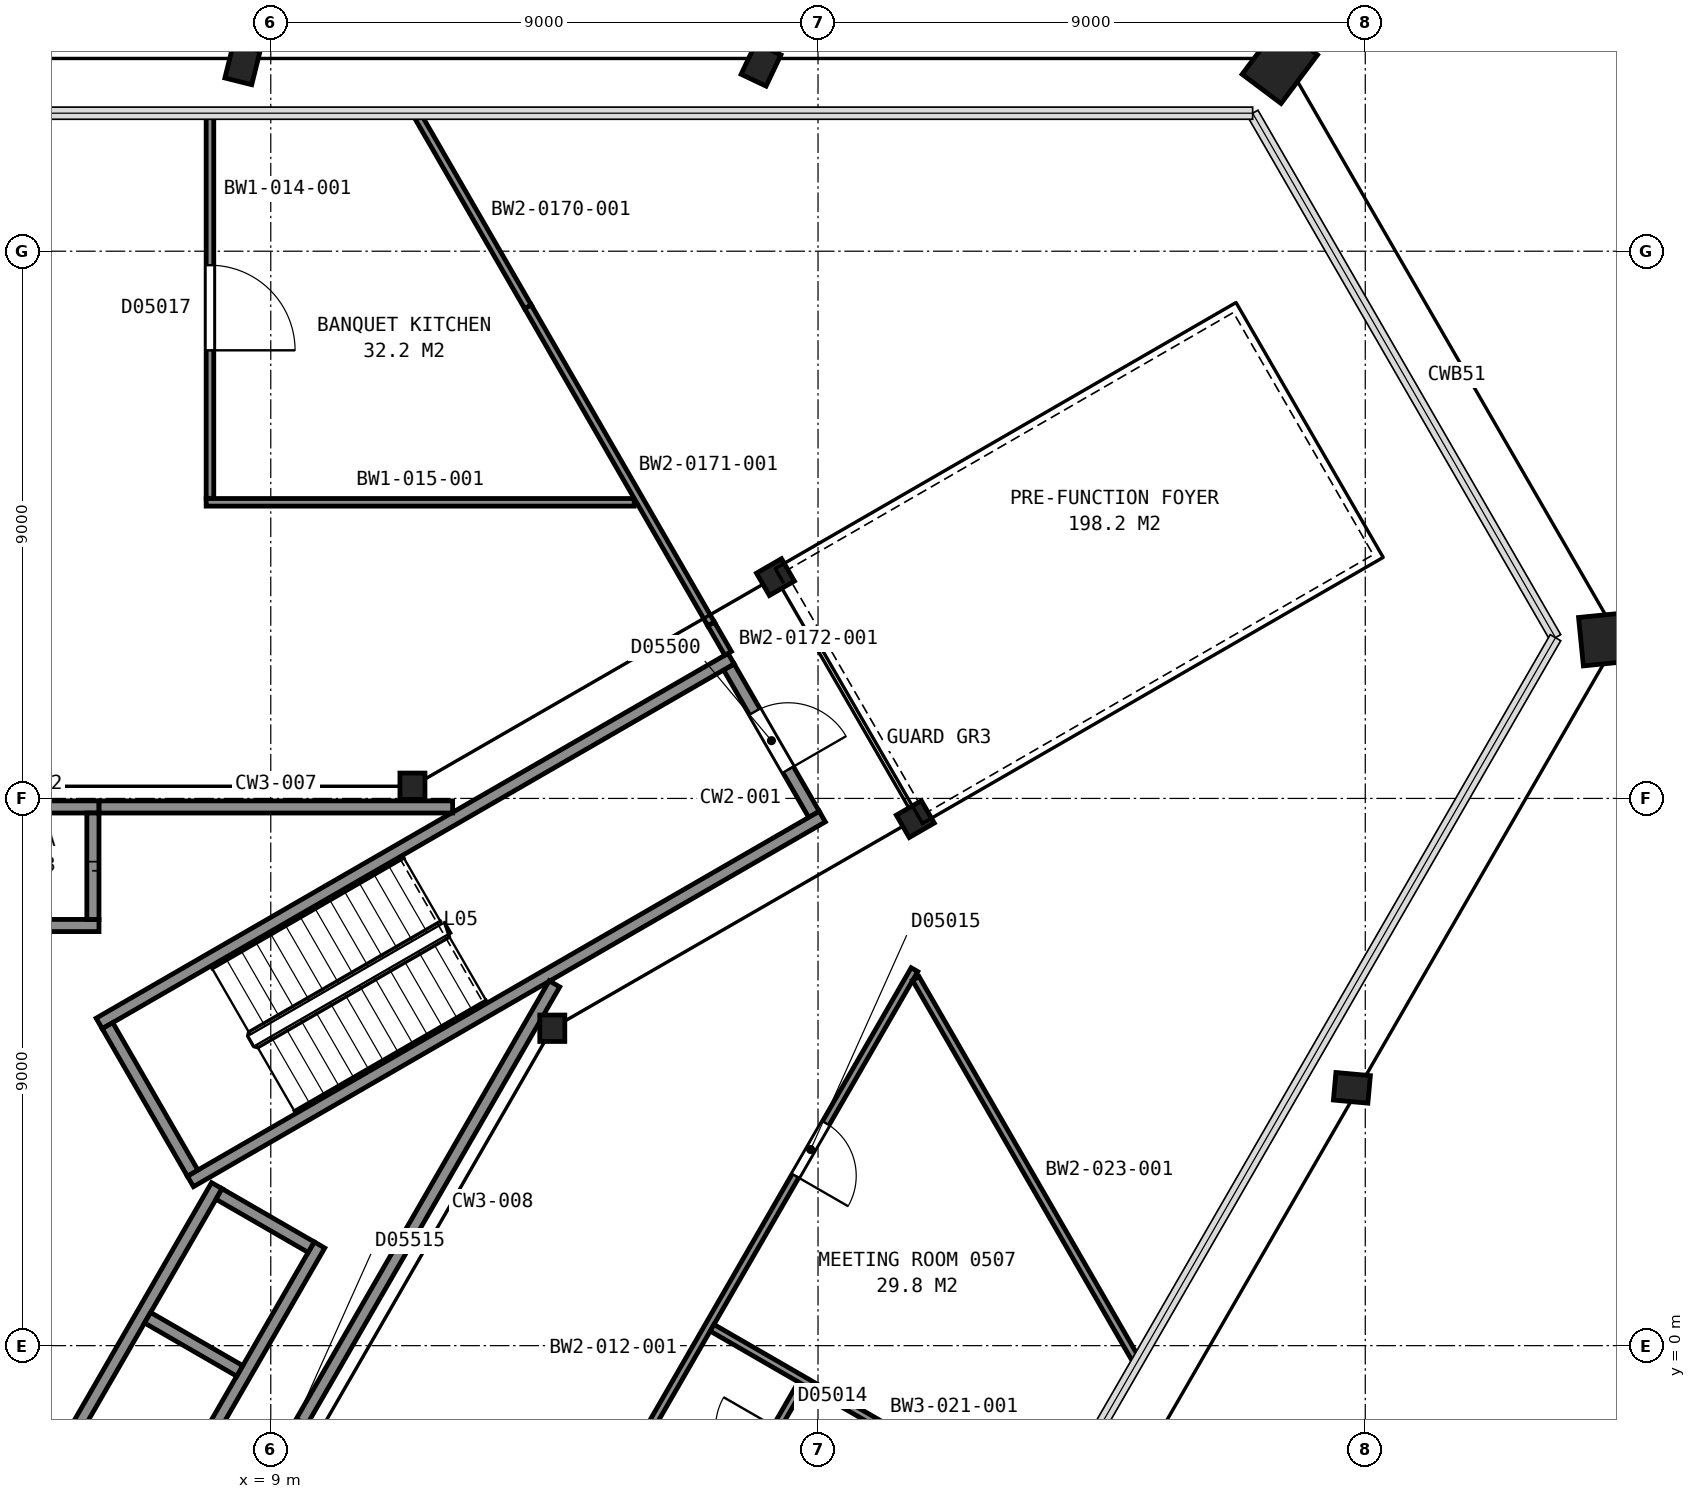
"""IFC4 building model, lengths in metres.
Left out: names, types, materials, properties, quantities, classifications, styles, units other than length and angle.
Written with IfcOpenShell. Run it as: python <this file> out.ifc"""

import sys

from ifc_helpers import new_model, si_unit, direction, frame, frame_2d, origin, origin_2d, place, context, subcontext, project, spatial, rectangle, hollow_rectangle, i_section, extrude, element, fill, save


model = new_model("IFC4")
c1 = context("Model", 3, precision=1e-05, world=origin(), true_north=direction((0.0, 1.0)))
c2 = subcontext(c1, "Body", "Model", "MODEL_VIEW")
j1 = project(units=[si_unit("LENGTHUNIT", "METRE"), si_unit("PLANEANGLEUNIT", "RADIAN")], contexts=[c1])
p1 = place(None, origin())
s1 = spatial("IfcSite", under=j1, at=p1, CompositionType="ELEMENT")
p2 = place(p1, origin())
s2 = spatial("IfcBuilding", under=s1, at=p2, CompositionType="ELEMENT")
p3 = place(p2, frame((0.0, 0.0, 32.0)))
s3 = spatial("IfcBuildingStorey", under=s2, at=p3, CompositionType="ELEMENT", Elevation=32.0)
p4 = place(p3, frame((25.667, 21.166, 0.045), z_axis=(-0.06217640116, -0.082901868214, 0.994616195015), x_axis=(0.499582435164, -0.865300616168, -0.040892959465)))
e1 = element("IfcColumn", 1, at=p4, inside=s3, PredefinedType="COLUMN", context=c2, shape_type="SweptSolid", body=[
    extrude(hollow_rectangle(XDim=0.8, YDim=1.0, WallThickness=0.075, at=origin_2d()), origin(), (0.0, 0.0, 1.0), 4.735),
])
p5 = place(p3, frame((17.109, 21.167, 0.03), z_axis=(-0.039441005649, -0.082985106815, 0.995769993081), x_axis=(0.999217228346, -0.000227977802, 0.039558546511)))
e2 = element("IfcColumn", 2, at=p5, inside=s3, PredefinedType="COLUMN", context=c2, shape_type="SweptSolid", body=[
    extrude(i_section(OverallWidth=0.455, OverallDepth=0.569, WebThickness=0.078, FlangeThickness=0.125, FilletRadius=0.015, at=origin_2d()), origin(), (0.0, 0.0, 1.0), 4.76),
])
p6 = place(p3, frame((8.56, 21.168, 0.025), z_axis=(-0.020791051327, -0.083010576852, 0.996331760166), x_axis=(0.999783003146, -0.000434756363, 0.020826848233)))
e3 = element("IfcColumn", 3, at=p6, inside=s3, PredefinedType="COLUMN", context=c2, shape_type="SweptSolid", body=[
    extrude(i_section(OverallWidth=0.455, OverallDepth=0.569, WebThickness=0.078, FlangeThickness=0.125, FilletRadius=0.015, at=origin_2d()), origin(), (0.0, 0.0, 1.0), 4.768),
])
p7 = place(p3, frame((26.887, 4.23, 0.03), z_axis=(-0.091244770768, 0.008308967321, 0.995793830504), x_axis=(-0.499759929446, -0.865304652417, -0.03857293643)))
e4 = element("IfcColumn", 4, at=p7, inside=s3, PredefinedType="COLUMN", context=c2, shape_type="SweptSolid", body=[
    extrude(i_section(OverallWidth=0.455, OverallDepth=0.569, WebThickness=0.078, FlangeThickness=0.125, FilletRadius=0.015, at=origin_2d()), origin(), (0.0, 0.0, 1.0), 4.76),
])
p8 = place(p3, frame((31.165, 11.639, 0.045), z_axis=(-0.103570826852, -0.010310684605, 0.994568636952), x_axis=(0.499154841001, -0.865444824509, 0.043008143825)))
e5 = element("IfcColumn", 5, at=p8, inside=s3, PredefinedType="COLUMN", context=c2, shape_type="SweptSolid", body=[
    extrude(hollow_rectangle(XDim=0.8, YDim=1.0, WallThickness=0.075, at=origin_2d()), origin(), (0.0, 0.0, 1.0), 4.736),
])
p9 = place(p3, frame((13.63, 5.22, 0.0), z_axis=(0.0, 0.0, 1.0), x_axis=(1.0, 0.0, 0.0)))
e6 = element("IfcColumn", 6, at=p9, inside=s3, PredefinedType="COLUMN", context=c2, shape_type="SweptSolid", body=[
    extrude(i_section(OverallWidth=0.411, OverallDepth=0.434, WebThickness=0.036, FlangeThickness=0.057, FilletRadius=0.015, at=origin_2d()), origin(), (0.0, 0.0, 1.0), 4.8),
])
for number, where, z_axis, x_axis in (
    (7, (19.6, 8.66, 0.0), (0.0, 0.0, 1.0), (0.5, -0.866, 0.0)),
    (8, (17.3, 12.64, 0.0), (0.0, 0.0, 1.0), (0.5, -0.866, 0.0)),
):
    element("IfcColumn", number, at=place(p3, frame(where, z_axis=z_axis, x_axis=x_axis)), inside=s3, PredefinedType="COLUMN", context=c2, shape_type="SweptSolid", body=[
        extrude(i_section(OverallWidth=0.424, OverallDepth=0.475, WebThickness=0.048, FlangeThickness=0.077, FilletRadius=0.015, at=origin_2d()), origin(), (0.0, 0.0, 1.0), 4.8),
    ])
p10 = place(p3, frame((11.33, 9.2, 0.0), z_axis=(0.0, 0.0, 1.0), x_axis=(1.0, 0.0, 0.0)))
e9 = element("IfcColumn", 9, at=p10, inside=s3, PredefinedType="COLUMN", context=c2, shape_type="SweptSolid", body=[
    extrude(i_section(OverallWidth=0.411, OverallDepth=0.434, WebThickness=0.036, FlangeThickness=0.057, FilletRadius=0.015, at=origin_2d()), origin(), (0.0, 0.0, 1.0), 4.8),
])
p11 = place(p3, frame((17.934, 8.738, 0.0), z_axis=(0.0, 0.0, 1.0), x_axis=(-0.49998411664, 0.866034573852, 0.0)))
e10 = element("IfcWall", 10, at=p11, inside=s3, PredefinedType="PARTITIONING", context=c2, shape_type="SweptSolid", body=[
    extrude(rectangle(XDim=2.8, YDim=0.2, at=frame_2d((1.4, 0.0))), origin(), (0.0, 0.0, 1.0), 4.55),
])
p12 = place(p11, frame((0.85, 0.0, 0.0)))
e11 = element("IfcOpeningElement", 11, at=p12, cuts=e10, PredefinedType="OPENING", context=c2, shape_type="SweptSolid", body=[
    extrude(rectangle(XDim=1.1, YDim=2.1, at=frame_2d((0.55, 1.05))), frame((0.0, 0.11, 0.0), z_axis=(0.0, -1.0, 0.0), x_axis=(1.0, 0.0, 0.0)), (0.0, 0.0, 1.0), 0.22),
])
for number, where, z_axis, x_axis in (
    (12, (6.178, 5.299, 0.0), (0.0, 0.0, 1.0), (0.866, 0.5, 0.0)),
    (13, (7.678, 2.701, 0.0), (0.0, 0.0, 1.0), (0.866, 0.5, 0.0)),
):
    element("IfcWall", number, at=place(p3, frame(where, z_axis=z_axis, x_axis=x_axis)), inside=s3, PredefinedType="PARTITIONING", context=c2, shape_type="SweptSolid", body=[
        extrude(rectangle(XDim=12.0, YDim=0.2, at=frame_2d((6.0, 0.0))), origin(), (0.0, 0.0, 1.0), 4.55),
    ])
p13 = place(p3, frame((7.715, 2.838, 0.0), z_axis=(0.0, 0.0, 1.0), x_axis=(-0.500049511043, 0.865996816683, 0.0)))
e14 = element("IfcWall", 14, at=p13, inside=s3, PredefinedType="PARTITIONING", context=c2, shape_type="SweptSolid", body=[
    extrude(rectangle(XDim=2.8, YDim=0.2, at=frame_2d((1.4, 0.0))), origin(), (0.0, 0.0, 1.0), 4.55),
])
for number, where, z_axis, x_axis in (
    (15, (3.625, 6.91, 0.0), (0.0, 0.0, 1.0), (1.0, 0.0, 0.0)),
    (16, (3.625, 8.86, 0.0), (0.0, 0.0, 1.0), (1.0, 0.0, 0.0)),
):
    element("IfcWall", number, at=place(p3, frame(where, z_axis=z_axis, x_axis=x_axis)), inside=s3, PredefinedType="PARTITIONING", context=c2, shape_type="SweptSolid", body=[
        extrude(rectangle(XDim=2.55, YDim=0.2, at=frame_2d((1.275, 0.0))), origin(), (0.0, 0.0, 1.0), 4.8),
    ])
p14 = place(p3, frame((7.451, -2.414, 0.0), z_axis=(0.0, 0.0, 1.0), x_axis=(0.500016218704, 0.866016039709, 0.0)))
e17 = element("IfcWall", 17, at=p14, inside=s3, PredefinedType="PARTITIONING", context=c2, shape_type="SweptSolid", body=[
    extrude(rectangle(XDim=4.7, YDim=0.2, at=frame_2d((2.35, 0.0))), origin(), (0.0, 0.0, 1.0), 4.8),
])
p15 = place(p3, frame((5.663, -1.612, 0.0), z_axis=(0.0, 0.0, 1.0), x_axis=(0.49998122708, 0.866036242063, 0.0)))
e18 = element("IfcWall", 18, at=p15, inside=s3, PredefinedType="PARTITIONING", context=c2, shape_type="SweptSolid", body=[
    extrude(rectangle(XDim=4.9, YDim=0.2, at=frame_2d((2.45, 0.0))), origin(), (0.0, 0.0, 1.0), 4.8),
])
p16 = place(p3, frame((6.075, 7.01, 0.0), z_axis=(0.0, 0.0, 1.0), x_axis=(0.0, 1.0, 0.0)))
e19 = element("IfcWall", 19, at=p16, inside=s3, PredefinedType="PARTITIONING", context=c2, shape_type="SweptSolid", body=[
    extrude(rectangle(XDim=1.75, YDim=0.2, at=frame_2d((0.875, 0.0))), origin(), (0.0, 0.0, 1.0), 4.8),
])
p17 = place(p3, frame((9.665, 1.62, 0.0), z_axis=(0.0, 0.0, 1.0), x_axis=(-0.866002029911, 0.500040482552, 0.0)))
e20 = element("IfcWall", 20, at=p17, inside=s3, PredefinedType="PARTITIONING", context=c2, shape_type="SweptSolid", body=[
    extrude(rectangle(XDim=1.75, YDim=0.2, at=frame_2d((0.875, 0.0))), origin(), (0.0, 0.0, 1.0), 4.8),
])
p18 = place(p3, frame((8.49, -0.416, 0.0), z_axis=(0.0, 0.0, 1.0), x_axis=(-0.866036909293, 0.499980071345, 0.0)))
e21 = element("IfcWall", 21, at=p18, inside=s3, PredefinedType="PARTITIONING", context=c2, shape_type="SweptSolid", body=[
    extrude(rectangle(XDim=1.75, YDim=0.2, at=frame_2d((0.875, 0.0))), origin(), (0.0, 0.0, 1.0), 4.8),
])
p19 = place(p3, frame((6.177, 8.86, 0.0), z_axis=(0.0, 0.0, 1.0), x_axis=(1.0, 0.0, 0.0)))
e22 = element("IfcWall", 22, at=p19, inside=s3, PredefinedType="PARTITIONING", context=c2, shape_type="SweptSolid", body=[
    extrude(rectangle(XDim=5.814, YDim=0.2, at=frame_2d((2.907, 0.0))), origin(), (0.0, 0.0, 1.0), 4.55),
])
p20 = place(p3, frame((8.492, -3.012, 0.0), z_axis=(0.0, 0.0, 1.0), x_axis=(0.499972957231, 0.866041016371, 0.0)))
e23 = element("IfcWall", 23, at=p20, inside=s3, PredefinedType="PARTITIONING", context=c2, shape_type="SweptSolid", body=[
    extrude(rectangle(XDim=10.349, YDim=0.2, at=frame_2d((5.174, 0.0))), origin(), (0.0, 0.0, 1.0), 4.55),
])
p21 = place(p20, frame((0.25, 0.0, 0.0)))
e24 = element("IfcOpeningElement", 24, at=p21, cuts=e23, PredefinedType="OPENING", context=c2, shape_type="SweptSolid", body=[
    extrude(rectangle(XDim=1.8, YDim=2.1, at=frame_2d((0.9, 1.05))), frame((0.0, 0.11, 0.0), z_axis=(0.0, -1.0, 0.0), x_axis=(1.0, 0.0, 0.0)), (0.0, 0.0, 1.0), 0.22),
])
p22 = place(p3, frame((19.586, 6.184, 0.0), z_axis=(0.0, 0.0, 1.0), x_axis=(-0.499994028088, -0.866028851642, 0.0)))
e25 = element("IfcWall", 25, at=p22, inside=s3, PredefinedType="PARTITIONING", context=c2, shape_type="SweptSolid", body=[
    extrude(rectangle(XDim=30.297, YDim=0.125, at=frame_2d((15.148, 0.0))), origin(), (0.0, 0.0, 1.0), 3.793),
])
p23 = place(p22, frame((26.385, 0.0, 0.0)))
e26 = element("IfcOpeningElement", 26, at=p23, cuts=e25, PredefinedType="OPENING", context=c2, shape_type="SweptSolid", body=[
    extrude(rectangle(XDim=1.0, YDim=2.1, at=frame_2d((0.5, 1.05))), frame((0.0, 0.073, 0.0), z_axis=(0.0, -1.0, 0.0), x_axis=(1.0, 0.0, 0.0)), (0.0, 0.0, 1.0), 0.145),
])
p24 = place(p22, frame((20.932, 0.0, 0.0)))
e27 = element("IfcOpeningElement", 27, at=p24, cuts=e25, PredefinedType="OPENING", context=c2, shape_type="SweptSolid", body=[
    extrude(rectangle(XDim=1.0, YDim=2.1, at=frame_2d((0.5, 1.05))), frame((0.0, 0.073, 0.0), z_axis=(0.0, -1.0, 0.0), x_axis=(1.0, 0.0, 0.0)), (0.0, 0.0, 1.0), 0.145),
])
p25 = place(p22, frame((16.741, 0.0, 0.0)))
e28 = element("IfcOpeningElement", 28, at=p25, cuts=e25, PredefinedType="OPENING", context=c2, shape_type="SweptSolid", body=[
    extrude(rectangle(XDim=1.0, YDim=2.1, at=frame_2d((0.5, 1.05))), frame((0.0, 0.073, 0.0), z_axis=(0.0, -1.0, 0.0), x_axis=(1.0, 0.0, 0.0)), (0.0, 0.0, 1.0), 0.145),
])
p26 = place(p22, frame((10.449, 0.0, 0.0)))
e29 = element("IfcOpeningElement", 29, at=p26, cuts=e25, PredefinedType="OPENING", context=c2, shape_type="SweptSolid", body=[
    extrude(rectangle(XDim=1.0, YDim=2.1, at=frame_2d((0.5, 1.05))), frame((0.0, 0.073, 0.0), z_axis=(0.0, -1.0, 0.0), x_axis=(1.0, 0.0, 0.0)), (0.0, 0.0, 1.0), 0.145),
])
p27 = place(p22, frame((2.916, 0.0, 0.0)))
e30 = element("IfcOpeningElement", 30, at=p27, cuts=e25, PredefinedType="OPENING", context=c2, shape_type="SweptSolid", body=[
    extrude(rectangle(XDim=1.0, YDim=2.1, at=frame_2d((0.5, 1.05))), frame((0.0, 0.073, 0.0), z_axis=(0.0, -1.0, 0.0), x_axis=(1.0, 0.0, 0.0)), (0.0, 0.0, 1.0), 0.145),
])
p28 = place(p3, frame((8.0, 20.27, 0.0), z_axis=(0.0, 0.0, 1.0), x_axis=(0.0, -1.0, 0.0)))
e31 = element("IfcWall", 31, at=p28, inside=s3, PredefinedType="PARTITIONING", context=c2, shape_type="SweptSolid", body=[
    extrude(rectangle(XDim=6.335, YDim=0.125, at=frame_2d((3.167, 0.0))), origin(), (0.0, 0.0, 1.0), 4.64),
])
p29 = place(p28, frame((2.5, 0.0, 0.0)))
e32 = element("IfcOpeningElement", 32, at=p29, cuts=e31, PredefinedType="OPENING", context=c2, shape_type="SweptSolid", body=[
    extrude(rectangle(XDim=1.4, YDim=2.1, at=frame_2d((0.7, 1.05))), frame((0.0, 0.073, 0.0), z_axis=(0.0, -1.0, 0.0), x_axis=(1.0, 0.0, 0.0)), (0.0, 0.0, 1.0), 0.145),
])
p30 = place(p3, frame((7.938, 13.87, 0.0), z_axis=(0.0, 0.0, 1.0), x_axis=(1.0, 0.0, 0.0)))
e33 = element("IfcWall", 33, at=p30, inside=s3, PredefinedType="PARTITIONING", context=c2, shape_type="SweptSolid", body=[
    extrude(rectangle(XDim=7.04, YDim=0.125, at=frame_2d((3.52, 0.0))), origin(), (0.0, 0.0, 1.0), 4.64),
])
p31 = place(p3, frame((11.391, 20.27, 0.0), z_axis=(0.0, 0.0, 1.0), x_axis=(0.500036521051, -0.866004317319, 0.0)))
e34 = element("IfcWall", 34, at=p31, inside=s3, PredefinedType="PARTITIONING", context=c2, shape_type="SweptSolid", body=[
    extrude(rectangle(XDim=3.678, YDim=0.125, at=frame_2d((1.839, 0.0))), origin(), (0.0, 0.0, 1.0), 4.64),
])
p32 = place(p3, frame((13.23, 17.084, 0.0), z_axis=(0.0, 0.0, 1.0), x_axis=(0.500062816623, -0.865989133553, 0.0)))
e35 = element("IfcWall", 35, at=p32, inside=s3, PredefinedType="PARTITIONING", context=c2, shape_type="SweptSolid", body=[
    extrude(rectangle(XDim=6.023, YDim=0.125, at=frame_2d((3.011, 0.0))), origin(), (0.0, 0.0, 1.0), 3.793),
])
p33 = place(p3, frame((16.242, 11.869, 0.0), z_axis=(0.0, 0.0, 1.0), x_axis=(0.500000383388, -0.866025182435, 0.0)))
e36 = element("IfcWall", 36, at=p33, inside=s3, PredefinedType="PARTITIONING", context=c2, shape_type="SweptSolid", body=[
    extrude(rectangle(XDim=0.558, YDim=0.125, at=frame_2d((0.279, 0.0))), origin(), (0.0, 0.0, 1.0), 4.64),
])
p34 = place(p3, frame((17.731, -0.629, 0.0), z_axis=(0.0, 0.0, 1.0), x_axis=(-0.499948523739, -0.866055121578, 0.0)))
e37 = element("IfcWall", 37, at=p34, inside=s3, PredefinedType="PARTITIONING", context=c2, shape_type="SweptSolid", body=[
    extrude(rectangle(XDim=8.258, YDim=0.125, at=frame_2d((4.129, 0.0))), origin(), (0.0, 0.0, 1.0), 4.64),
])
p35 = place(p34, frame((6.42, 0.0, 0.0)))
e38 = element("IfcOpeningElement", 38, at=p35, cuts=e37, PredefinedType="OPENING", context=c2, shape_type="SweptSolid", body=[
    extrude(rectangle(XDim=1.0, YDim=2.1, at=frame_2d((0.5, 1.05))), frame((0.0, 0.073, 0.0), z_axis=(0.0, -1.0, 0.0), x_axis=(1.0, 0.0, 0.0)), (0.0, 0.0, 1.0), 0.145),
])
p36 = place(p34, frame((3.626, 0.0, 0.0)))
e39 = element("IfcOpeningElement", 39, at=p36, cuts=e37, PredefinedType="OPENING", context=c2, shape_type="SweptSolid", body=[
    extrude(rectangle(XDim=1.0, YDim=2.1, at=frame_2d((0.5, 1.05))), frame((0.0, 0.073, 0.0), z_axis=(0.0, -1.0, 0.0), x_axis=(1.0, 0.0, 0.0)), (0.0, 0.0, 1.0), 0.145),
])
p37 = place(p34, frame((0.831, 0.0, 0.0)))
e40 = element("IfcOpeningElement", 40, at=p37, cuts=e37, PredefinedType="OPENING", context=c2, shape_type="SweptSolid", body=[
    extrude(rectangle(XDim=1.0, YDim=2.1, at=frame_2d((0.5, 1.05))), frame((0.0, 0.073, 0.0), z_axis=(0.0, -1.0, 0.0), x_axis=(1.0, 0.0, 0.0)), (0.0, 0.0, 1.0), 0.145),
])
p38 = place(p3, frame((16.258, 0.294, 0.0), z_axis=(0.0, 0.0, 1.0), x_axis=(0.866013003808, -0.500021476775, 0.0)))
e41 = element("IfcWall", 41, at=p38, inside=s3, PredefinedType="PARTITIONING", context=c2, shape_type="SweptSolid", body=[
    extrude(rectangle(XDim=6.337, YDim=0.125, at=frame_2d((3.168, 0.0))), origin(), (0.0, 0.0, 1.0), 3.793),
])
p39 = place(p3, frame((19.607, 6.039, 0.0), z_axis=(0.0, 0.0, 1.0), x_axis=(0.500002873931, -0.866023744513, 0.0)))
e42 = element("IfcWall", 42, at=p39, inside=s3, PredefinedType="PARTITIONING", context=c2, shape_type="SweptSolid", body=[
    extrude(rectangle(XDim=7.285, YDim=0.125, at=frame_2d((3.643, 0.0))), origin(), (0.0, 0.0, 1.0), 4.64),
])
p40 = place(p12, origin())
e43 = element("IfcDoor", 43, at=p40, inside=s3, OperationType="SINGLE_SWING_LEFT", PredefinedType="DOOR", context=c2, shape_type="SweptSolid", body=[
    extrude(rectangle(XDim=1.1, YDim=2.1, at=frame_2d((0.55, 1.05))), frame((0.0, 0.025, 0.0), z_axis=(0.0, -1.0, 0.0), x_axis=(1.0, 0.0, 0.0)), (0.0, 0.0, 1.0), 0.05),
])
fill(e11, e43)
p41 = place(p27, origin())
e44 = element("IfcDoor", 44, at=p41, inside=s3, OperationType="SINGLE_SWING_RIGHT", PredefinedType="DOOR", context=c2, shape_type="SweptSolid", body=[
    extrude(rectangle(XDim=1.0, YDim=2.1, at=frame_2d((0.5, 1.05))), frame((0.0, 0.025, 0.0), z_axis=(0.0, -1.0, 0.0), x_axis=(1.0, 0.0, 0.0)), (0.0, 0.0, 1.0), 0.05),
])
fill(e30, e44)
p42 = place(p29, origin())
e45 = element("IfcDoor", 45, at=p42, inside=s3, OperationType="SINGLE_SWING_RIGHT", PredefinedType="DOOR", context=c2, shape_type="SweptSolid", body=[
    extrude(rectangle(XDim=1.4, YDim=2.1, at=frame_2d((0.7, 1.05))), frame((0.0, 0.025, 0.0), z_axis=(0.0, -1.0, 0.0), x_axis=(1.0, 0.0, 0.0)), (0.0, 0.0, 1.0), 0.05),
])
fill(e32, e45)
save(model, sys.argv[1])
